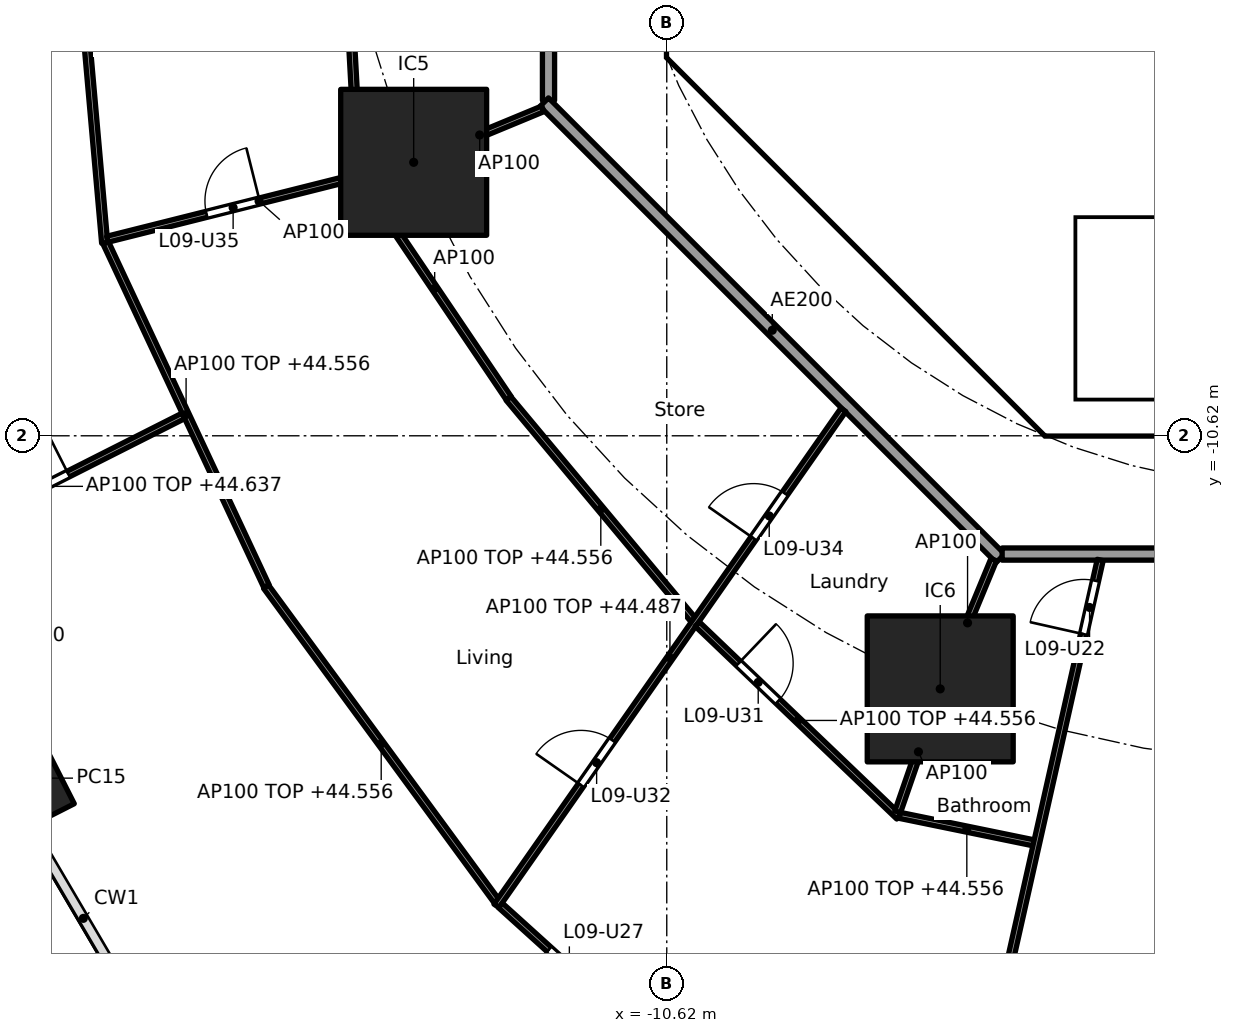
"""IFC4 building model, lengths in metres.
Left out: names, types, materials, properties, quantities, classifications, styles, units other than length and angle.
Written with IfcOpenShell. Run it as: python <this file> out.ifc"""

import sys

from ifc_helpers import new_model, si_unit, direction, frame, frame_2d, origin, origin_2d, place, context, subcontext, project, spatial, polyline, rectangle, hollow_rectangle, outline, extrude, element, fill, save


model = new_model("IFC4")
c1 = context("Model", 3, precision=1e-05, world=origin(), true_north=direction((0.0, 1.0)))
c2 = subcontext(c1, "Body", "Model", "MODEL_VIEW")
j1 = project(units=[si_unit("LENGTHUNIT", "METRE"), si_unit("PLANEANGLEUNIT", "RADIAN")], contexts=[c1])
p1 = place(None, origin())
s1 = spatial("IfcSite", under=j1, at=p1, CompositionType="ELEMENT")
p2 = place(p1, origin())
s2 = spatial("IfcBuilding", under=s1, at=p2, CompositionType="ELEMENT")
p3 = place(p2, frame((0.0, 0.0, 41.8)))
s3 = spatial("IfcBuildingStorey", under=s2, at=p3, CompositionType="ELEMENT", Elevation=41.8)
p4 = place(p3, frame((-21.082, -16.25, 0.0), z_axis=(0.0, 0.0, 1.0), x_axis=(0.452462697578, -0.891783329795, 0.0)))
e1 = element("IfcColumn", 1, at=p4, inside=s3, PredefinedType="COLUMN", context=c2, shape_type="SweptSolid", body=[
    extrude(hollow_rectangle(XDim=1.4, YDim=0.9, WallThickness=0.05, at=origin_2d()), origin(), (0.0, 0.0, 1.0), 3.7),
])
for number, where, z_axis, x_axis in (
    (2, (-14.782, -6.123, 0.0), (0.0, 0.0, 1.0), (1.0, 0.0, 0.0)),
    (3, (-6.123, -14.782, 0.0), (0.0, 0.0, 1.0), (1.0, 0.0, 0.0)),
):
    element("IfcColumn", number, at=place(p3, frame(where, z_axis=z_axis, x_axis=x_axis)), inside=s3, PredefinedType="COLUMN", context=c2, shape_type="SweptSolid", body=[
        extrude(rectangle(XDim=2.4, YDim=2.4, at=origin_2d()), origin(), (0.0, 0.0, 1.0), 3.7),
    ])
p5 = place(p3, frame((-9.988, -4.613, 0.0), z_axis=(0.0, 0.0, 1.0), x_axis=(0.707106781187, -0.707106781187, 0.0)))
e4 = element("IfcWall", 4, at=p5, inside=s3, PredefinedType="SHEAR", context=c2, shape_type="SweptSolid", body=[
    extrude(rectangle(XDim=7.602, YDim=0.6, at=frame_2d((3.801, 0.0))), origin(), (0.0, 0.0, 1.0), 3.44),
])
p6 = place(p5, frame((6.151, 0.0, 0.0)))
e5 = element("IfcOpeningElement", 5, at=p6, cuts=e4, PredefinedType="OPENING", context=c2, shape_type="SweptSolid", body=[
    extrude(rectangle(XDim=1.1, YDim=2.1, at=frame_2d((0.55, 1.05))), frame((0.0, 0.31, 0.0), z_axis=(0.0, -1.0, 0.0), x_axis=(1.0, 0.0, 0.0)), (0.0, 0.0, 1.0), 0.62),
])
p7 = place(p3, frame((-6.2, -7.827, 0.0), z_axis=(0.0, 0.0, 1.0), x_axis=(0.0, 1.0, 0.0)))
e6 = element("IfcWall", 6, at=p7, inside=s3, PredefinedType="PARTITIONING", context=c2, shape_type="SweptSolid", body=[
    extrude(rectangle(XDim=3.527, YDim=0.15, at=frame_2d((1.763, 0.0))), origin(), (0.0, 0.0, 1.0), 3.44),
])
p8 = place(p7, frame((2.365, 0.0, 0.0)))
e7 = element("IfcOpeningElement", 7, at=p8, cuts=e6, PredefinedType="OPENING", context=c2, shape_type="SweptSolid", body=[
    extrude(rectangle(XDim=0.9, YDim=2.1, at=frame_2d((0.45, 1.05))), frame((0.0, 0.085, 0.0), z_axis=(0.0, -1.0, 0.0), x_axis=(1.0, 0.0, 0.0)), (0.0, 0.0, 1.0), 0.17),
])
p9 = place(p7, frame((0.489, 0.0, 0.0)))
e8 = element("IfcOpeningElement", 8, at=p9, cuts=e6, PredefinedType="OPENING", context=c2, shape_type="SweptSolid", body=[
    extrude(rectangle(XDim=0.9, YDim=2.1, at=frame_2d((0.45, 1.05))), frame((0.0, 0.085, 0.0), z_axis=(0.0, -1.0, 0.0), x_axis=(1.0, 0.0, 0.0)), (0.0, 0.0, 1.0), 0.17),
])
p10 = place(p3, frame((-4.0, -6.5, 0.0), z_axis=(0.0, 0.0, 1.0), x_axis=(0.0, 1.0, 0.0)))
e9 = element("IfcWall", 9, at=p10, inside=s3, PredefinedType="SOLIDWALL", context=c2, shape_type="SweptSolid", body=[
    extrude(rectangle(XDim=2.2, YDim=0.2, at=frame_2d((1.1, 0.0))), origin(), (0.0, 0.0, 1.0), 3.44),
])
p11 = place(p10, frame((0.65, 0.0, 0.0)))
e10 = element("IfcOpeningElement", 10, at=p11, cuts=e9, PredefinedType="OPENING", context=c2, shape_type="SweptSolid", body=[
    extrude(rectangle(XDim=0.9, YDim=2.1, at=frame_2d((0.45, 1.05))), frame((0.0, 0.11, 0.0), z_axis=(0.0, -1.0, 0.0), x_axis=(1.0, 0.0, 0.0)), (0.0, 0.0, 1.0), 0.22),
])
p12 = place(p3, origin())
e11 = element("IfcWall", 11, at=p12, inside=s3, PredefinedType="SHEAR", context=c2, shape_type="SweptSolid", body=[
    extrude(outline(polyline([(-10.625, -3.801), (-10.025, -3.801), (-10.025, -4.152), (-9.776, -4.401), (-10.2, -4.825), (-10.625, -4.401), (-10.625, -3.801)])), origin(), (0.0, 0.0, 1.0), 3.44),
])
p13 = place(p3, origin())
e12 = element("IfcWall", 12, at=p13, inside=s3, PredefinedType="SHEAR", context=c2, shape_type="SweptSolid", body=[
    extrude(outline(polyline([(-4.152, -10.025), (4.152, -10.025), (4.401, -9.776), (4.825, -10.2), (4.401, -10.625), (-4.401, -10.625), (-4.825, -10.2), (-4.401, -9.776), (-4.152, -10.025)])), origin(), (0.0, 0.0, 1.0), 3.44),
])
p14 = place(p3, frame((-8.301, -5.8, 0.0), z_axis=(0.0, 0.0, 1.0), x_axis=(1.0, 0.0, 0.0)))
e13 = element("IfcWall", 13, at=p14, inside=s3, PredefinedType="PARTITIONING", context=c2, shape_type="SweptSolid", body=[
    extrude(rectangle(XDim=2.026, YDim=0.15, at=frame_2d((1.013, 0.0))), origin(), (0.0, 0.0, 1.0), 3.44),
])
p15 = place(p3, origin())
e14 = element("IfcWall", 14, at=p15, inside=s3, PredefinedType="SOLIDWALL", context=c2, shape_type="SweptSolid", body=[
    extrude(outline(polyline([(-3.9, -10.025), (-4.1, -10.025), (-4.1, -7.025), (-3.9, -7.025), (-3.9, -10.025)])), origin(), (0.0, 0.0, 1.0), 3.44),
])
p16 = place(p3, origin())
e15 = element("IfcWall", 15, at=p16, inside=s3, PredefinedType="SOLIDWALL", context=c2, shape_type="SweptSolid", body=[
    extrude(outline(polyline([(4.1, -7.025), (-4.1, -7.025), (-4.1, -6.5), (4.1, -6.5), (4.1, -7.025)])), origin(), (0.0, 0.0, 1.0), 3.44),
])
p17 = place(p3, frame((-12.565, 5.304, 0.0), z_axis=(0.0, 0.0, 1.0), x_axis=(0.0, -1.0, 0.0)))
e16 = element("IfcWall", 16, at=p17, inside=s3, PredefinedType="PARTITIONING", context=c2, shape_type="SweptSolid", body=[
    extrude(rectangle(XDim=10.409, YDim=0.2, at=frame_2d((5.205, 0.0))), origin(), (0.0, 0.0, 1.0), 3.44),
])
p18 = place(p3, frame((-12.635, -5.134, 0.0), z_axis=(0.0, 0.0, 1.0), x_axis=(0.707106781187, -0.707106781187, 0.0)))
e17 = element("IfcWall", 17, at=p18, inside=s3, PredefinedType="PARTITIONING", context=c2, shape_type="SweptSolid", body=[
    extrude(rectangle(XDim=10.609, YDim=0.2, at=frame_2d((5.305, 0.0))), origin(), (0.0, 0.0, 1.0), 3.44),
])
p19 = place(p3, frame((-5.104, -12.565, 0.0), z_axis=(0.0, 0.0, 1.0), x_axis=(1.0, 0.0, 0.0)))
e18 = element("IfcWall", 18, at=p19, inside=s3, PredefinedType="PARTITIONING", context=c2, shape_type="SweptSolid", body=[
    extrude(rectangle(XDim=10.409, YDim=0.2, at=frame_2d((5.205, 0.0))), origin(), (0.0, 0.0, 1.0), 3.44),
])
p20 = place(p19, frame((2.87, 0.0, 0.0)))
e19 = element("IfcOpeningElement", 19, at=p20, cuts=e18, PredefinedType="OPENING", context=c2, shape_type="SweptSolid", body=[
    extrude(rectangle(XDim=1.0, YDim=2.1, at=frame_2d((0.5, 1.05))), frame((0.0, 0.11, 0.0), z_axis=(0.0, -1.0, 0.0), x_axis=(1.0, 0.0, 0.0)), (0.0, 0.0, 1.0), 0.22),
])
p21 = place(p3, frame((-16.033, 0.05, 0.0), z_axis=(0.0, 0.0, 1.0), x_axis=(0.054634315779, -0.998506430395, 0.0)))
e20 = element("IfcWall", 20, at=p21, inside=s3, PredefinedType="PARTITIONING", context=c2, shape_type="SweptSolid", body=[
    extrude(rectangle(XDim=6.359, YDim=0.1, at=frame_2d((3.179, 0.0))), origin(), (0.0, 0.0, 1.0), 2.756),
])
p22 = place(p21, frame((2.754, 0.0, 0.0)))
e21 = element("IfcOpeningElement", 21, at=p22, cuts=e20, PredefinedType="OPENING", context=c2, shape_type="SweptSolid", body=[
    extrude(rectangle(XDim=0.9, YDim=2.1, at=frame_2d((0.45, 1.05))), frame((0.0, 0.06, 0.0), z_axis=(0.0, -1.0, 0.0), x_axis=(1.0, 0.0, 0.0)), (0.0, 0.0, 1.0), 0.12),
])
p23 = place(p3, frame((-20.527, 0.05, 0.0), z_axis=(0.0, 0.0, 1.0), x_axis=(0.088135127406, -0.996108527881, 0.0)))
e22 = element("IfcWall", 22, at=p23, inside=s3, PredefinedType="PARTITIONING", context=c2, shape_type="SweptSolid", body=[
    extrude(rectangle(XDim=7.529, YDim=0.1, at=frame_2d((3.765, 0.0))), origin(), (0.0, 0.0, 1.0), 2.756),
])
p24 = place(p3, frame((-20.245, -3.706, 0.0), z_axis=(0.0, 0.0, 1.0), x_axis=(-0.992575966227, -0.121626277047, 0.0)))
e23 = element("IfcWall", 23, at=p24, inside=s3, PredefinedType="PARTITIONING", context=c2, shape_type="SweptSolid", body=[
    extrude(rectangle(XDim=4.904, YDim=0.1, at=frame_2d((2.452, 0.0))), origin(), (0.0, 0.0, 1.0), 2.837),
])
p25 = place(p24, frame((2.002, 0.0, 0.0)))
e24 = element("IfcOpeningElement", 24, at=p25, cuts=e23, PredefinedType="OPENING", context=c2, shape_type="SweptSolid", body=[
    extrude(rectangle(XDim=0.9, YDim=2.1, at=frame_2d((0.45, 1.05))), frame((0.0, 0.06, 0.0), z_axis=(0.0, -1.0, 0.0), x_axis=(1.0, 0.0, 0.0)), (0.0, 0.0, 1.0), 0.12),
])
p26 = place(p3, frame((-12.657, -5.243, 0.0), z_axis=(0.0, 0.0, 1.0), x_axis=(-0.923864733477, -0.382719158442, 0.0)))
e25 = element("IfcWall", 25, at=p26, inside=s3, PredefinedType="PARTITIONING", context=c2, shape_type="SweptSolid", body=[
    extrude(rectangle(XDim=2.25, YDim=0.1, at=frame_2d((1.125, 0.0))), origin(), (0.0, 0.0, 1.0), 3.44),
])
p27 = place(p3, frame((-14.831, -6.135, 0.0), z_axis=(0.0, 0.0, 1.0), x_axis=(-0.96988230015, -0.243574062362, 0.0)))
e26 = element("IfcWall", 26, at=p27, inside=s3, PredefinedType="PARTITIONING", context=c2, shape_type="SweptSolid", body=[
    extrude(rectangle(XDim=5.144, YDim=0.1, at=frame_2d((2.572, 0.0))), origin(), (0.0, 0.0, 1.0), 3.44),
])
p28 = place(p27, frame((2.561, 0.0, 0.0)))
e27 = element("IfcOpeningElement", 27, at=p28, cuts=e26, PredefinedType="OPENING", context=c2, shape_type="SweptSolid", body=[
    extrude(rectangle(XDim=0.9, YDim=2.1, at=frame_2d((0.45, 1.05))), frame((0.0, 0.06, 0.0), z_axis=(0.0, -1.0, 0.0), x_axis=(1.0, 0.0, 0.0)), (0.0, 0.0, 1.0), 0.12),
])
p29 = place(p3, frame((-15.655, -6.391, 0.0), z_axis=(0.0, 0.0, 1.0), x_axis=(0.559126445155, -0.82908239538, 0.0)))
e28 = element("IfcWall", 28, at=p29, inside=s3, PredefinedType="PARTITIONING", context=c2, shape_type="SweptSolid", body=[
    extrude(rectangle(XDim=4.358, YDim=0.1, at=frame_2d((2.179, 0.0))), origin(), (0.0, 0.0, 1.0), 3.44),
])
p30 = place(p3, frame((-19.847, -7.445, 0.0), z_axis=(0.0, 0.0, 1.0), x_axis=(0.423892287987, -0.905712607942, 0.0)))
e29 = element("IfcWall", 29, at=p30, inside=s3, PredefinedType="PARTITIONING", context=c2, shape_type="SweptSolid", body=[
    extrude(rectangle(XDim=6.238, YDim=0.1, at=frame_2d((3.119, 0.0))), origin(), (0.0, 0.0, 1.0), 2.756),
])
p31 = place(p3, frame((-18.569, -10.292, 0.0), z_axis=(0.0, 0.0, 1.0), x_axis=(-0.892519131357, -0.451009534446, 0.0)))
e30 = element("IfcWall", 30, at=p31, inside=s3, PredefinedType="PARTITIONING", context=c2, shape_type="SweptSolid", body=[
    extrude(rectangle(XDim=5.14, YDim=0.1, at=frame_2d((2.57, 0.0))), origin(), (0.0, 0.0, 1.0), 2.837),
])
p32 = place(p31, frame((2.12, 0.0, 0.0)))
e31 = element("IfcOpeningElement", 31, at=p32, cuts=e30, PredefinedType="OPENING", context=c2, shape_type="SweptSolid", body=[
    extrude(rectangle(XDim=0.9, YDim=2.1, at=frame_2d((0.45, 1.05))), frame((0.0, 0.06, 0.0), z_axis=(0.0, -1.0, 0.0), x_axis=(1.0, 0.0, 0.0)), (0.0, 0.0, 1.0), 0.12),
])
p33 = place(p3, frame((-13.222, -10.007, 0.0), z_axis=(0.0, 0.0, 1.0), x_axis=(0.640807748916, -0.767701393075, 0.0)))
e32 = element("IfcWall", 32, at=p33, inside=s3, PredefinedType="PARTITIONING", context=c2, shape_type="SweptSolid", body=[
    extrude(rectangle(XDim=4.737, YDim=0.1, at=frame_2d((2.368, 0.0))), origin(), (0.0, 0.0, 1.0), 2.756),
])
p34 = place(p3, frame((-17.211, -13.1, 0.0), z_axis=(0.0, 0.0, 1.0), x_axis=(0.591206785834, -0.806520016109, 0.0)))
e33 = element("IfcWall", 33, at=p34, inside=s3, PredefinedType="PARTITIONING", context=c2, shape_type="SweptSolid", body=[
    extrude(rectangle(XDim=6.41, YDim=0.1, at=frame_2d((3.205, 0.0))), origin(), (0.0, 0.0, 1.0), 2.756),
])
p35 = place(p3, frame((-7.715, -10.193, 0.0), z_axis=(0.0, 0.0, 1.0), x_axis=(-0.573126502256, -0.819466907454, 0.0)))
e34 = element("IfcWall", 34, at=p35, inside=s3, PredefinedType="PARTITIONING", context=c2, shape_type="SweptSolid", body=[
    extrude(rectangle(XDim=9.954, YDim=0.1, at=frame_2d((4.977, 0.0))), origin(), (0.0, 0.0, 1.0), 2.687),
])
p36 = place(p35, frame((6.631, 0.0, 0.0)))
e35 = element("IfcOpeningElement", 35, at=p36, cuts=e34, PredefinedType="OPENING", context=c2, shape_type="SweptSolid", body=[
    extrude(rectangle(XDim=0.9, YDim=2.1, at=frame_2d((0.45, 1.05))), frame((0.0, 0.06, 0.0), z_axis=(0.0, -1.0, 0.0), x_axis=(1.0, 0.0, 0.0)), (0.0, 0.0, 1.0), 0.12),
])
p37 = place(p35, frame((1.678, 0.0, 0.0)))
e36 = element("IfcOpeningElement", 36, at=p37, cuts=e34, PredefinedType="OPENING", context=c2, shape_type="SweptSolid", body=[
    extrude(rectangle(XDim=0.9, YDim=2.1, at=frame_2d((0.45, 1.05))), frame((0.0, 0.06, 0.0), z_axis=(0.0, -1.0, 0.0), x_axis=(1.0, 0.0, 0.0)), (0.0, 0.0, 1.0), 0.12),
])
p38 = place(p3, frame((-10.119, -13.716, 0.0), z_axis=(0.0, 0.0, 1.0), x_axis=(0.722763212502, -0.69109575216, 0.0)))
e37 = element("IfcWall", 37, at=p38, inside=s3, PredefinedType="PARTITIONING", context=c2, shape_type="SweptSolid", body=[
    extrude(rectangle(XDim=4.587, YDim=0.1, at=frame_2d((2.293, 0.0))), origin(), (0.0, 0.0, 1.0), 2.756),
])
p39 = place(p38, frame((0.938, 0.0, 0.0)))
e38 = element("IfcOpeningElement", 38, at=p39, cuts=e37, PredefinedType="OPENING", context=c2, shape_type="SweptSolid", body=[
    extrude(rectangle(XDim=0.9, YDim=2.1, at=frame_2d((0.45, 1.05))), frame((0.0, 0.06, 0.0), z_axis=(0.0, -1.0, 0.0), x_axis=(1.0, 0.0, 0.0)), (0.0, 0.0, 1.0), 0.12),
])
p40 = place(p3, frame((-13.355, -18.343, 0.0), z_axis=(0.0, 0.0, 1.0), x_axis=(0.741720189244, -0.670709445936, 0.0)))
e39 = element("IfcWall", 39, at=p40, inside=s3, PredefinedType="PARTITIONING", context=c2, shape_type="SweptSolid", body=[
    extrude(rectangle(XDim=6.209, YDim=0.1, at=frame_2d((3.104, 0.0))), origin(), (0.0, 0.0, 1.0), 2.756),
])
p41 = place(p40, frame((1.077, 0.0, 0.0)))
e40 = element("IfcOpeningElement", 40, at=p41, cuts=e39, PredefinedType="OPENING", context=c2, shape_type="SweptSolid", body=[
    extrude(rectangle(XDim=0.9, YDim=2.1, at=frame_2d((0.45, 1.05))), frame((0.0, 0.06, 0.0), z_axis=(0.0, -1.0, 0.0), x_axis=(1.0, 0.0, 0.0)), (0.0, 0.0, 1.0), 0.12),
])
p42 = place(p3, frame((-5.243, -12.657, 0.0), z_axis=(0.0, 0.0, 1.0), x_axis=(-0.382719158442, -0.923864733477, 0.0)))
e41 = element("IfcWall", 41, at=p42, inside=s3, PredefinedType="PARTITIONING", context=c2, shape_type="SweptSolid", body=[
    extrude(rectangle(XDim=2.25, YDim=0.1, at=frame_2d((1.125, 0.0))), origin(), (0.0, 0.0, 1.0), 3.44),
])
p43 = place(p3, frame((-6.139, -14.83, 0.0), z_axis=(0.0, 0.0, 1.0), x_axis=(-0.327246993321, -0.944938836837, 0.0)))
e42 = element("IfcWall", 42, at=p43, inside=s3, PredefinedType="PARTITIONING", context=c2, shape_type="SweptSolid", body=[
    extrude(rectangle(XDim=2.09, YDim=0.1, at=frame_2d((1.045, 0.0))), origin(), (0.0, 0.0, 1.0), 3.44),
])
p44 = place(p3, frame((-6.791, -16.862, 0.0), z_axis=(0.0, 0.0, 1.0), x_axis=(0.979581941859, -0.201045316246, 0.0)))
e43 = element("IfcWall", 43, at=p44, inside=s3, PredefinedType="PARTITIONING", context=c2, shape_type="SweptSolid", body=[
    extrude(rectangle(XDim=2.256, YDim=0.1, at=frame_2d((1.128, 0.0))), origin(), (0.0, 0.0, 1.0), 2.756),
])
p45 = place(p3, frame((-3.492, -12.662, 0.0), z_axis=(0.0, 0.0, 1.0), x_axis=(-0.219268088006, -0.975664648115, 0.0)))
e44 = element("IfcWall", 44, at=p45, inside=s3, PredefinedType="PARTITIONING", context=c2, shape_type="SweptSolid", body=[
    extrude(rectangle(XDim=18.23, YDim=0.1, at=frame_2d((9.115, 0.0))), origin(), (0.0, 0.0, 1.0), 2.687),
])
p46 = place(p45, frame((0.35, 0.0, 0.0)))
e45 = element("IfcOpeningElement", 45, at=p46, cuts=e44, PredefinedType="OPENING", context=c2, shape_type="SweptSolid", body=[
    extrude(rectangle(XDim=0.9, YDim=2.1, at=frame_2d((0.45, 1.05))), frame((0.0, 0.06, 0.0), z_axis=(0.0, -1.0, 0.0), x_axis=(1.0, 0.0, 0.0)), (0.0, 0.0, 1.0), 0.12),
])
p47 = place(p45, frame((7.497, 0.0, 0.0)))
e46 = element("IfcOpeningElement", 46, at=p47, cuts=e44, PredefinedType="OPENING", context=c2, shape_type="SweptSolid", body=[
    extrude(rectangle(XDim=0.9, YDim=2.1, at=frame_2d((0.45, 1.05))), frame((0.0, 0.06, 0.0), z_axis=(0.0, -1.0, 0.0), x_axis=(1.0, 0.0, 0.0)), (0.0, 0.0, 1.0), 0.12),
])
p48 = place(p8, origin())
e47 = element("IfcDoor", 47, at=p48, inside=s3, OperationType="SINGLE_SWING_RIGHT", PredefinedType="DOOR", context=c2, shape_type="SweptSolid", body=[
    extrude(rectangle(XDim=0.9, YDim=2.1, at=frame_2d((0.45, 1.05))), frame((0.0, 0.025, 0.0), z_axis=(0.0, -1.0, 0.0), x_axis=(1.0, 0.0, 0.0)), (0.0, 0.0, 1.0), 0.05),
])
fill(e7, e47)
p49 = place(p9, origin())
e48 = element("IfcDoor", 48, at=p49, inside=s3, OperationType="SINGLE_SWING_RIGHT", PredefinedType="DOOR", context=c2, shape_type="SweptSolid", body=[
    extrude(rectangle(XDim=0.9, YDim=2.1, at=frame_2d((0.45, 1.05))), frame((0.0, 0.025, 0.0), z_axis=(0.0, -1.0, 0.0), x_axis=(1.0, 0.0, 0.0)), (0.0, 0.0, 1.0), 0.05),
])
fill(e8, e48)
p50 = place(p11, frame((0.9, 0.0, 0.0), x_axis=(-1.0, 0.0, 0.0)))
e49 = element("IfcDoor", 49, at=p50, inside=s3, OperationType="SINGLE_SWING_RIGHT", PredefinedType="DOOR", context=c2, shape_type="SweptSolid", body=[
    extrude(rectangle(XDim=0.9, YDim=2.1, at=frame_2d((0.45, 1.05))), frame((0.0, 0.025, 0.0), z_axis=(0.0, -1.0, 0.0), x_axis=(1.0, 0.0, 0.0)), (0.0, 0.0, 1.0), 0.05),
])
fill(e10, e49)
p51 = place(p6, origin())
e50 = element("IfcDoor", 50, at=p51, inside=s3, OperationType="SINGLE_SWING_RIGHT", PredefinedType="DOOR", context=c2, shape_type="SweptSolid", body=[
    extrude(rectangle(XDim=1.1, YDim=2.1, at=frame_2d((0.55, 1.05))), frame((0.0, 0.025, 0.0), z_axis=(0.0, -1.0, 0.0), x_axis=(1.0, 0.0, 0.0)), (0.0, 0.0, 1.0), 0.05),
])
fill(e5, e50)
p52 = place(p46, frame((0.9, 0.0, 0.0), x_axis=(-1.0, 0.0, 0.0)))
e51 = element("IfcDoor", 51, at=p52, inside=s3, OperationType="SINGLE_SWING_LEFT", PredefinedType="DOOR", context=c2, shape_type="SweptSolid", body=[
    extrude(rectangle(XDim=0.9, YDim=2.1, at=frame_2d((0.45, 1.05))), frame((0.0, 0.025, 0.0), z_axis=(0.0, -1.0, 0.0), x_axis=(1.0, 0.0, 0.0)), (0.0, 0.0, 1.0), 0.05),
])
fill(e45, e51)
p53 = place(p41, frame((0.9, 0.0, 0.0), x_axis=(-1.0, 0.0, 0.0)))
e52 = element("IfcDoor", 52, at=p53, inside=s3, OperationType="SINGLE_SWING_RIGHT", PredefinedType="DOOR", context=c2, shape_type="SweptSolid", body=[
    extrude(rectangle(XDim=0.9, YDim=2.1, at=frame_2d((0.45, 1.05))), frame((0.0, 0.025, 0.0), z_axis=(0.0, -1.0, 0.0), x_axis=(1.0, 0.0, 0.0)), (0.0, 0.0, 1.0), 0.05),
])
fill(e40, e52)
p54 = place(p39, origin())
e53 = element("IfcDoor", 53, at=p54, inside=s3, OperationType="SINGLE_SWING_LEFT", PredefinedType="DOOR", context=c2, shape_type="SweptSolid", body=[
    extrude(rectangle(XDim=0.9, YDim=2.1, at=frame_2d((0.45, 1.05))), frame((0.0, 0.025, 0.0), z_axis=(0.0, -1.0, 0.0), x_axis=(1.0, 0.0, 0.0)), (0.0, 0.0, 1.0), 0.05),
])
fill(e38, e53)
p55 = place(p36, frame((0.9, 0.0, 0.0), x_axis=(-1.0, 0.0, 0.0)))
e54 = element("IfcDoor", 54, at=p55, inside=s3, OperationType="SINGLE_SWING_LEFT", PredefinedType="DOOR", context=c2, shape_type="SweptSolid", body=[
    extrude(rectangle(XDim=0.9, YDim=2.1, at=frame_2d((0.45, 1.05))), frame((0.0, 0.025, 0.0), z_axis=(0.0, -1.0, 0.0), x_axis=(1.0, 0.0, 0.0)), (0.0, 0.0, 1.0), 0.05),
])
fill(e35, e54)
p56 = place(p32, frame((0.9, 0.0, 0.0), x_axis=(-1.0, 0.0, 0.0)))
e55 = element("IfcDoor", 55, at=p56, inside=s3, OperationType="SINGLE_SWING_RIGHT", PredefinedType="DOOR", context=c2, shape_type="SweptSolid", body=[
    extrude(rectangle(XDim=0.9, YDim=2.1, at=frame_2d((0.45, 1.05))), frame((0.0, 0.025, 0.0), z_axis=(0.0, -1.0, 0.0), x_axis=(1.0, 0.0, 0.0)), (0.0, 0.0, 1.0), 0.05),
])
fill(e31, e55)
p57 = place(p37, frame((0.9, 0.0, 0.0), x_axis=(-1.0, 0.0, 0.0)))
e56 = element("IfcDoor", 56, at=p57, inside=s3, OperationType="SINGLE_SWING_LEFT", PredefinedType="DOOR", context=c2, shape_type="SweptSolid", body=[
    extrude(rectangle(XDim=0.9, YDim=2.1, at=frame_2d((0.45, 1.05))), frame((0.0, 0.025, 0.0), z_axis=(0.0, -1.0, 0.0), x_axis=(1.0, 0.0, 0.0)), (0.0, 0.0, 1.0), 0.05),
])
fill(e36, e56)
p58 = place(p28, frame((0.9, 0.0, 0.0), x_axis=(-1.0, 0.0, 0.0)))
e57 = element("IfcDoor", 57, at=p58, inside=s3, OperationType="SINGLE_SWING_RIGHT", PredefinedType="DOOR", context=c2, shape_type="SweptSolid", body=[
    extrude(rectangle(XDim=0.9, YDim=2.1, at=frame_2d((0.45, 1.05))), frame((0.0, 0.025, 0.0), z_axis=(0.0, -1.0, 0.0), x_axis=(1.0, 0.0, 0.0)), (0.0, 0.0, 1.0), 0.05),
])
fill(e27, e57)
save(model, sys.argv[1])
